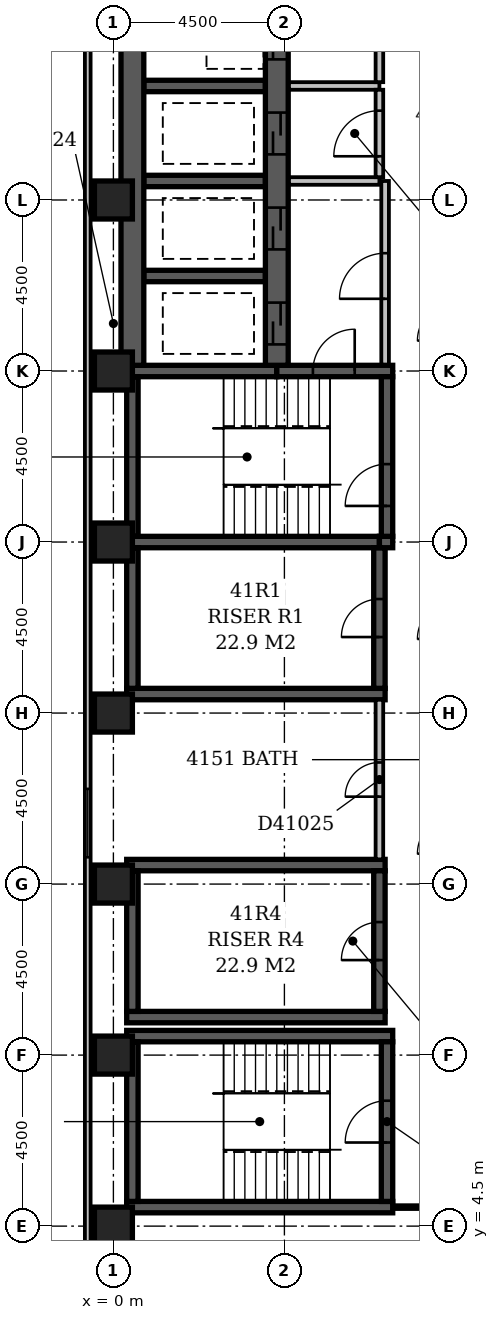
"""IFC4 building model, lengths in metres.
Left out: names, types, materials, properties, quantities, classifications, styles, units other than length and angle.
Written with IfcOpenShell. Run it as: python <this file> out.ifc"""

import sys

from ifc_helpers import new_model, si_unit, direction, frame, frame_2d, origin, origin_2d, place, context, subcontext, project, spatial, rectangle, extrude, element, fill, save


model = new_model("IFC4")
c1 = context("Model", 3, precision=1e-05, world=origin(), true_north=direction((0.0, 1.0)))
c2 = subcontext(c1, "Body", "Model", "MODEL_VIEW")
j1 = project(units=[si_unit("LENGTHUNIT", "METRE"), si_unit("PLANEANGLEUNIT", "RADIAN")], contexts=[c1])
p1 = place(None, origin())
s1 = spatial("IfcSite", under=j1, at=p1, CompositionType="ELEMENT")
p2 = place(p1, origin())
s2 = spatial("IfcBuilding", under=s1, at=p2, CompositionType="ELEMENT")
p3 = place(p2, frame((0.0, 0.0, 162.8)))
s3 = spatial("IfcBuildingStorey", under=s2, at=p3, CompositionType="ELEMENT", Elevation=162.8)
for number, where, z_axis, x_axis in (
    (1, (0.35, 5.0, -0.3), (0.0, 0.0, 1.0), (1.0, 0.0, 0.0)),
    (2, (0.35, 9.5, -0.3), (0.0, 0.0, 1.0), (1.0, 0.0, 0.0)),
):
    element("IfcWall", number, at=place(p3, frame(where, z_axis=z_axis, x_axis=x_axis)), inside=s3, PredefinedType="SHEAR", context=c2, shape_type="SweptSolid", body=[
        extrude(rectangle(XDim=7.0, YDim=0.3, at=frame_2d((3.5, 0.0))), origin(), (0.0, 0.0, 1.0), 3.6),
    ])
for number, where, z_axis, x_axis in (
    (3, (0.35, 10.0, -0.3), (0.0, 0.0, 1.0), (1.0, 0.0, 0.0)),
    (4, (0.35, 14.0, -0.3), (0.0, 0.0, 1.0), (1.0, 0.0, 0.0)),
    (5, (0.35, 18.5, -0.3), (0.0, 0.0, 1.0), (1.0, 0.0, 0.0)),
):
    element("IfcWall", number, at=place(p3, frame(where, z_axis=z_axis, x_axis=x_axis)), inside=s3, PredefinedType="SHEAR", context=c2, shape_type="SweptSolid", body=[
        extrude(rectangle(XDim=6.8, YDim=0.3, at=frame_2d((3.4, 0.0))), origin(), (0.0, 0.0, 1.0), 3.6),
    ])
p4 = place(p3, frame((0.35, 22.5, -0.3), z_axis=(0.0, 0.0, 1.0), x_axis=(1.0, 0.0, 0.0)))
e6 = element("IfcWall", 6, at=p4, inside=s3, PredefinedType="SHEAR", context=c2, shape_type="SweptSolid", body=[
    extrude(rectangle(XDim=6.65, YDim=0.3, at=frame_2d((3.325, 0.0))), origin(), (0.0, 0.0, 1.0), 3.6),
])
p5 = place(p3, frame((0.35, 27.0, -0.3), z_axis=(0.0, 0.0, 1.0), x_axis=(1.0, 0.0, 0.0)))
e7 = element("IfcWall", 7, at=p5, inside=s3, PredefinedType="SHEAR", context=c2, shape_type="SweptSolid", body=[
    extrude(rectangle(XDim=3.95, YDim=0.3, at=frame_2d((1.975, 0.0))), origin(), (0.0, 0.0, 1.0), 3.6),
])
p6 = place(p3, frame((0.5, 5.15, -0.3), z_axis=(0.0, 0.0, 1.0), x_axis=(0.0, 1.0, 0.0)))
e8 = element("IfcWall", 8, at=p6, inside=s3, PredefinedType="SHEAR", context=c2, shape_type="SweptSolid", body=[
    extrude(rectangle(XDim=4.2, YDim=0.3, at=frame_2d((2.1, 0.0))), origin(), (0.0, 0.0, 1.0), 3.6),
])
for number, where, z_axis, x_axis in (
    (9, (0.5, 10.15, -0.3), (0.0, 0.0, 1.0), (0.0, 1.0, 0.0)),
    (10, (0.5, 18.65, -0.3), (0.0, 0.0, 1.0), (0.0, 1.0, 0.0)),
):
    element("IfcWall", number, at=place(p3, frame(where, z_axis=z_axis, x_axis=x_axis)), inside=s3, PredefinedType="SHEAR", context=c2, shape_type="SweptSolid", body=[
        extrude(rectangle(XDim=3.7, YDim=0.3, at=frame_2d((1.85, 0.0))), origin(), (0.0, 0.0, 1.0), 3.6),
    ])
p7 = place(p3, frame((0.5, 22.65, -0.3), z_axis=(0.0, 0.0, 1.0), x_axis=(0.0, 1.0, 0.0)))
e11 = element("IfcWall", 11, at=p7, inside=s3, PredefinedType="SHEAR", context=c2, shape_type="SweptSolid", body=[
    extrude(rectangle(XDim=4.2, YDim=0.3, at=frame_2d((2.1, 0.0))), origin(), (0.0, 0.0, 1.0), 3.6),
])
p8 = place(p3, frame((0.5, 27.15, -0.3), z_axis=(0.0, 0.0, 1.0), x_axis=(0.0, 1.0, 0.0)))
e12 = element("IfcWall", 12, at=p8, inside=s3, PredefinedType="SHEAR", context=c2, shape_type="SweptSolid", body=[
    extrude(rectangle(XDim=22.05, YDim=0.6, at=frame_2d((11.025, 0.0))), origin(), (0.0, 0.0, 1.0), 3.6),
])
for number, where, z_axis, x_axis in (
    (13, (0.8, 29.5, -0.3), (0.0, 0.0, 1.0), (1.0, 0.0, 0.0)),
    (14, (0.8, 32.0, -0.3), (0.0, 0.0, 1.0), (1.0, 0.0, 0.0)),
    (15, (0.8, 34.5, -0.3), (0.0, 0.0, 1.0), (1.0, 0.0, 0.0)),
):
    element("IfcWall", number, at=place(p3, frame(where, z_axis=z_axis, x_axis=x_axis)), inside=s3, PredefinedType="SHEAR", context=c2, shape_type="SweptSolid", body=[
        extrude(rectangle(XDim=3.2, YDim=0.3, at=frame_2d((1.6, 0.0))), origin(), (0.0, 0.0, 1.0), 3.6),
    ])
p9 = place(p3, frame((4.3, 27.0, -0.3), z_axis=(0.0, 0.0, 1.0), x_axis=(1.0, 0.0, 0.0)))
e16 = element("IfcWall", 16, at=p9, inside=s3, PredefinedType="SHEAR", context=c2, shape_type="SweptSolid", body=[
    extrude(rectangle(XDim=3.05, YDim=0.3, at=frame_2d((1.525, 0.0))), origin(), (0.0, 0.0, 1.0), 3.6),
])
p10 = place(p9, frame((0.95, 0.0, 0.3)))
e17 = element("IfcOpeningElement", 17, at=p10, cuts=e16, PredefinedType="OPENING", context=c2, shape_type="SweptSolid", body=[
    extrude(rectangle(XDim=1.1, YDim=2.1, at=frame_2d((0.55, 1.05))), frame((0.0, 0.162, 0.0), z_axis=(0.0, -1.0, 0.0), x_axis=(1.0, 0.0, 0.0)), (0.0, 0.0, 1.0), 0.324),
])
p11 = place(p3, frame((4.3, 27.15, -0.3), z_axis=(0.0, 0.0, 1.0), x_axis=(0.0, 1.0, 0.0)))
e18 = element("IfcWall", 18, at=p11, inside=s3, PredefinedType="SHEAR", context=c2, shape_type="SweptSolid", body=[
    extrude(rectangle(XDim=22.05, YDim=0.6, at=frame_2d((11.025, 0.0))), origin(), (0.0, 0.0, 1.0), 3.6),
])
p12 = place(p11, frame((3.05, 0.0, 0.3)))
e19 = element("IfcOpeningElement", 19, at=p12, cuts=e18, PredefinedType="OPENING", context=c2, shape_type="SweptSolid", body=[
    extrude(rectangle(XDim=1.1, YDim=2.1, at=frame_2d((0.55, 1.05))), frame((0.0, 0.312, 0.0), z_axis=(0.0, -1.0, 0.0), x_axis=(1.0, 0.0, 0.0)), (0.0, 0.0, 1.0), 0.624),
])
p13 = place(p11, frame((0.55, 0.0, 0.3)))
e20 = element("IfcOpeningElement", 20, at=p13, cuts=e18, PredefinedType="OPENING", context=c2, shape_type="SweptSolid", body=[
    extrude(rectangle(XDim=1.1, YDim=2.1, at=frame_2d((0.55, 1.05))), frame((0.0, 0.312, 0.0), z_axis=(0.0, -1.0, 0.0), x_axis=(1.0, 0.0, 0.0)), (0.0, 0.0, 1.0), 0.624),
])
p14 = place(p11, frame((20.55, 0.0, 0.3)))
e21 = element("IfcOpeningElement", 21, at=p14, cuts=e18, PredefinedType="OPENING", context=c2, shape_type="SweptSolid", body=[
    extrude(rectangle(XDim=1.1, YDim=2.1, at=frame_2d((0.55, 1.05))), frame((0.0, 0.312, 0.0), z_axis=(0.0, -1.0, 0.0), x_axis=(1.0, 0.0, 0.0)), (0.0, 0.0, 1.0), 0.624),
])
p15 = place(p11, frame((18.05, 0.0, 0.3)))
e22 = element("IfcOpeningElement", 22, at=p15, cuts=e18, PredefinedType="OPENING", context=c2, shape_type="SweptSolid", body=[
    extrude(rectangle(XDim=1.1, YDim=2.1, at=frame_2d((0.55, 1.05))), frame((0.0, 0.312, 0.0), z_axis=(0.0, -1.0, 0.0), x_axis=(1.0, 0.0, 0.0)), (0.0, 0.0, 1.0), 0.624),
])
p16 = place(p11, frame((15.55, 0.0, 0.3)))
e23 = element("IfcOpeningElement", 23, at=p16, cuts=e18, PredefinedType="OPENING", context=c2, shape_type="SweptSolid", body=[
    extrude(rectangle(XDim=1.1, YDim=2.1, at=frame_2d((0.55, 1.05))), frame((0.0, 0.312, 0.0), z_axis=(0.0, -1.0, 0.0), x_axis=(1.0, 0.0, 0.0)), (0.0, 0.0, 1.0), 0.624),
])
p17 = place(p11, frame((13.05, 0.0, 0.3)))
e24 = element("IfcOpeningElement", 24, at=p17, cuts=e18, PredefinedType="OPENING", context=c2, shape_type="SweptSolid", body=[
    extrude(rectangle(XDim=1.1, YDim=2.1, at=frame_2d((0.55, 1.05))), frame((0.0, 0.312, 0.0), z_axis=(0.0, -1.0, 0.0), x_axis=(1.0, 0.0, 0.0)), (0.0, 0.0, 1.0), 0.624),
])
p18 = place(p11, frame((10.55, 0.0, 0.3)))
e25 = element("IfcOpeningElement", 25, at=p18, cuts=e18, PredefinedType="OPENING", context=c2, shape_type="SweptSolid", body=[
    extrude(rectangle(XDim=1.1, YDim=2.1, at=frame_2d((0.55, 1.05))), frame((0.0, 0.312, 0.0), z_axis=(0.0, -1.0, 0.0), x_axis=(1.0, 0.0, 0.0)), (0.0, 0.0, 1.0), 0.624),
])
p19 = place(p11, frame((8.05, 0.0, 0.3)))
e26 = element("IfcOpeningElement", 26, at=p19, cuts=e18, PredefinedType="OPENING", context=c2, shape_type="SweptSolid", body=[
    extrude(rectangle(XDim=1.1, YDim=2.1, at=frame_2d((0.55, 1.05))), frame((0.0, 0.312, 0.0), z_axis=(0.0, -1.0, 0.0), x_axis=(1.0, 0.0, 0.0)), (0.0, 0.0, 1.0), 0.624),
])
p20 = place(p11, frame((5.55, 0.0, 0.3)))
e27 = element("IfcOpeningElement", 27, at=p20, cuts=e18, PredefinedType="OPENING", context=c2, shape_type="SweptSolid", body=[
    extrude(rectangle(XDim=1.1, YDim=2.1, at=frame_2d((0.55, 1.05))), frame((0.0, 0.312, 0.0), z_axis=(0.0, -1.0, 0.0), x_axis=(1.0, 0.0, 0.0)), (0.0, 0.0, 1.0), 0.624),
])
p21 = place(p3, frame((7.0, 10.15, -0.3), z_axis=(0.0, 0.0, 1.0), x_axis=(0.0, 1.0, 0.0)))
e28 = element("IfcWall", 28, at=p21, inside=s3, PredefinedType="SHEAR", context=c2, shape_type="SweptSolid", body=[
    extrude(rectangle(XDim=3.7, YDim=0.3, at=frame_2d((1.85, 0.0))), origin(), (0.0, 0.0, 1.0), 3.6),
])
p22 = place(p21, frame((1.35, 0.0, 0.3)))
e29 = element("IfcOpeningElement", 29, at=p22, cuts=e28, PredefinedType="OPENING", context=c2, shape_type="SweptSolid", body=[
    extrude(rectangle(XDim=1.0, YDim=2.1, at=frame_2d((0.5, 1.05))), frame((0.0, 0.162, 0.0), z_axis=(0.0, -1.0, 0.0), x_axis=(1.0, 0.0, 0.0)), (0.0, 0.0, 1.0), 0.324),
])
p23 = place(p3, frame((7.0, 18.65, -0.3), z_axis=(0.0, 0.0, 1.0), x_axis=(0.0, 1.0, 0.0)))
e30 = element("IfcWall", 30, at=p23, inside=s3, PredefinedType="SHEAR", context=c2, shape_type="SweptSolid", body=[
    extrude(rectangle(XDim=3.7, YDim=0.3, at=frame_2d((1.85, 0.0))), origin(), (0.0, 0.0, 1.0), 3.6),
])
p24 = place(p23, frame((1.35, 0.0, 0.3)))
e31 = element("IfcOpeningElement", 31, at=p24, cuts=e30, PredefinedType="OPENING", context=c2, shape_type="SweptSolid", body=[
    extrude(rectangle(XDim=1.0, YDim=2.1, at=frame_2d((0.5, 1.05))), frame((0.0, 0.162, 0.0), z_axis=(0.0, -1.0, 0.0), x_axis=(1.0, 0.0, 0.0)), (0.0, 0.0, 1.0), 0.324),
])
p25 = place(p3, frame((7.0, 22.5, -0.3), z_axis=(0.0, 0.0, 1.0), x_axis=(1.0, 0.0, 0.0)))
e32 = element("IfcWall", 32, at=p25, inside=s3, PredefinedType="SHEAR", context=c2, shape_type="SweptSolid", body=[
    extrude(rectangle(XDim=0.35, YDim=0.3, at=frame_2d((0.175, 0.0))), origin(), (0.0, 0.0, 1.0), 3.6),
])
p26 = place(p3, frame((7.2, 5.15, -0.3), z_axis=(0.0, 0.0, 1.0), x_axis=(0.0, 1.0, 0.0)))
e33 = element("IfcWall", 33, at=p26, inside=s3, PredefinedType="SHEAR", context=c2, shape_type="SweptSolid", body=[
    extrude(rectangle(XDim=4.2, YDim=0.3, at=frame_2d((2.1, 0.0))), origin(), (0.0, 0.0, 1.0), 3.6),
])
p27 = place(p26, frame((1.55, 0.0, 0.3)))
e34 = element("IfcOpeningElement", 34, at=p27, cuts=e33, PredefinedType="OPENING", context=c2, shape_type="SweptSolid", body=[
    extrude(rectangle(XDim=1.1, YDim=2.1, at=frame_2d((0.55, 1.05))), frame((0.0, 0.162, 0.0), z_axis=(0.0, -1.0, 0.0), x_axis=(1.0, 0.0, 0.0)), (0.0, 0.0, 1.0), 0.324),
])
p28 = place(p3, frame((7.2, 22.65, -0.3), z_axis=(0.0, 0.0, 1.0), x_axis=(0.0, 1.0, 0.0)))
e35 = element("IfcWall", 35, at=p28, inside=s3, PredefinedType="SHEAR", context=c2, shape_type="SweptSolid", body=[
    extrude(rectangle(XDim=4.2, YDim=0.3, at=frame_2d((2.1, 0.0))), origin(), (0.0, 0.0, 1.0), 3.6),
])
p29 = place(p28, frame((0.8, 0.0, 0.3)))
e36 = element("IfcOpeningElement", 36, at=p29, cuts=e35, PredefinedType="OPENING", context=c2, shape_type="SweptSolid", body=[
    extrude(rectangle(XDim=1.1, YDim=2.1, at=frame_2d((0.55, 1.05))), frame((0.0, 0.162, 0.0), z_axis=(0.0, -1.0, 0.0), x_axis=(1.0, 0.0, 0.0)), (0.0, 0.0, 1.0), 0.324),
])
for number, where, z_axis, x_axis in (
    (37, (0.0, 4.5, -0.3), (0.0, 0.0, 1.0), (1.0, 0.0, 0.0)),
    (38, (0.0, 9.0, -0.3), (0.0, 0.0, 1.0), (1.0, 0.0, 0.0)),
    (39, (0.0, 13.5, -0.3), (0.0, 0.0, 1.0), (1.0, 0.0, 0.0)),
    (40, (0.0, 18.0, -0.3), (0.0, 0.0, 1.0), (1.0, 0.0, 0.0)),
    (41, (0.0, 22.5, -0.3), (0.0, 0.0, 1.0), (1.0, 0.0, 0.0)),
    (42, (0.0, 27.0, -0.3), (0.0, 0.0, 1.0), (1.0, 0.0, 0.0)),
    (43, (0.0, 31.5, -0.3), (0.0, 0.0, 1.0), (1.0, 0.0, 0.0)),
):
    element("IfcColumn", number, at=place(p3, frame(where, z_axis=z_axis, x_axis=x_axis)), inside=s3, PredefinedType="COLUMN", context=c2, shape_type="SweptSolid", body=[
        extrude(rectangle(XDim=1.0, YDim=1.0, at=origin_2d()), origin(), (0.0, 0.0, 1.0), 3.6),
    ])
p30 = place(p3, frame((-0.675, 59.1, 0.0), z_axis=(0.0, 0.0, 1.0), x_axis=(0.0, -1.0, 0.0)))
e44 = element("IfcWall", 44, at=p30, inside=s3, PredefinedType="STANDARD", context=c2, shape_type="SweptSolid", body=[
    extrude(rectangle(XDim=55.35, YDim=0.15, at=frame_2d((27.675, 0.0))), origin(), (0.0, 0.0, 1.0), 2.7),
])
p31 = place(p30, frame((43.095, 0.0, 0.6)))
e45 = element("IfcOpeningElement", 45, at=p31, cuts=e44, PredefinedType="OPENING", context=c2, shape_type="SweptSolid", body=[
    extrude(rectangle(XDim=1.8, YDim=1.8, at=frame_2d((0.9, 0.9))), frame((0.0, 0.087, 0.0), z_axis=(0.0, -1.0, 0.0), x_axis=(1.0, 0.0, 0.0)), (0.0, 0.0, 1.0), 0.174),
])
p32 = place(p3, frame((4.62, 34.5, 0.0), z_axis=(0.0, 0.0, 1.0), x_axis=(1.0, 0.0, 0.0)))
e46 = element("IfcWall", 46, at=p32, inside=s3, PredefinedType="PARTITIONING", context=c2, shape_type="SweptSolid", body=[
    extrude(rectangle(XDim=2.38, YDim=0.2, at=frame_2d((1.19, 0.0))), origin(), (0.0, 0.0, 1.0), 3.3),
])
p33 = place(p3, frame((7.0, 34.6, 0.0), z_axis=(0.0, 0.0, 1.0), x_axis=(0.0, 1.0, 0.0)))
e47 = element("IfcWall", 47, at=p33, inside=s3, PredefinedType="PARTITIONING", context=c2, shape_type="SweptSolid", body=[
    extrude(rectangle(XDim=14.9, YDim=0.2, at=frame_2d((7.45, 0.0))), origin(), (0.0, 0.0, 1.0), 3.3),
])
p34 = place(p33, frame((2.8, 0.0, 0.0)))
e48 = element("IfcOpeningElement", 48, at=p34, cuts=e47, PredefinedType="OPENING", context=c2, shape_type="SweptSolid", body=[
    extrude(rectangle(XDim=1.2, YDim=2.1, at=frame_2d((0.6, 1.05))), frame((0.0, 0.112, 0.0), z_axis=(0.0, -1.0, 0.0), x_axis=(1.0, 0.0, 0.0)), (0.0, 0.0, 1.0), 0.224),
])
p35 = place(p33, frame((9.8, 0.0, 0.0)))
e49 = element("IfcOpeningElement", 49, at=p35, cuts=e47, PredefinedType="OPENING", context=c2, shape_type="SweptSolid", body=[
    extrude(rectangle(XDim=1.2, YDim=2.1, at=frame_2d((0.6, 1.05))), frame((0.0, 0.112, 0.0), z_axis=(0.0, -1.0, 0.0), x_axis=(1.0, 0.0, 0.0)), (0.0, 0.0, 1.0), 0.224),
])
p36 = place(p3, frame((4.62, 32.0, 0.0), z_axis=(0.0, 0.0, 1.0), x_axis=(1.0, 0.0, 0.0)))
e50 = element("IfcWall", 50, at=p36, inside=s3, PredefinedType="PARTITIONING", context=c2, shape_type="SweptSolid", body=[
    extrude(rectangle(XDim=2.38, YDim=0.2, at=frame_2d((1.19, 0.0))), origin(), (0.0, 0.0, 1.0), 3.3),
])
p37 = place(p3, frame((7.0, 32.1, 0.0), z_axis=(0.0, 0.0, 1.0), x_axis=(0.0, 1.0, 0.0)))
e51 = element("IfcWall", 51, at=p37, inside=s3, PredefinedType="PARTITIONING", context=c2, shape_type="SweptSolid", body=[
    extrude(rectangle(XDim=2.3, YDim=0.2, at=frame_2d((1.15, 0.0))), origin(), (0.0, 0.0, 1.0), 3.3),
])
p38 = place(p37, frame((0.55, 0.0, 0.0)))
e52 = element("IfcOpeningElement", 52, at=p38, cuts=e51, PredefinedType="OPENING", context=c2, shape_type="SweptSolid", body=[
    extrude(rectangle(XDim=1.2, YDim=2.1, at=frame_2d((0.6, 1.05))), frame((0.0, 0.112, 0.0), z_axis=(0.0, -1.0, 0.0), x_axis=(1.0, 0.0, 0.0)), (0.0, 0.0, 1.0), 0.224),
])
p39 = place(p3, frame((7.15, 27.17, 0.0), z_axis=(0.0, 0.0, 1.0), x_axis=(0.0, 1.0, 0.0)))
e53 = element("IfcWall", 53, at=p39, inside=s3, PredefinedType="PARTITIONING", context=c2, shape_type="SweptSolid", body=[
    extrude(rectangle(XDim=4.83, YDim=0.2, at=frame_2d((2.415, 0.0))), origin(), (0.0, 0.0, 1.0), 3.3),
])
p40 = place(p39, frame((1.73, 0.0, 0.0)))
e54 = element("IfcOpeningElement", 54, at=p40, cuts=e53, PredefinedType="OPENING", context=c2, shape_type="SweptSolid", body=[
    extrude(rectangle(XDim=1.2, YDim=2.1, at=frame_2d((0.6, 1.05))), frame((0.0, 0.112, 0.0), z_axis=(0.0, -1.0, 0.0), x_axis=(1.0, 0.0, 0.0)), (0.0, 0.0, 1.0), 0.224),
])
p41 = place(p3, frame((0.0, 4.5, 0.0), z_axis=(0.0, 0.0, 1.0), x_axis=(0.0, 1.0, 0.0)))
e55 = element("IfcWall", 55, at=p41, inside=s3, PredefinedType="PARTITIONING", context=c2, shape_type="SweptSolid", body=[
    extrude(rectangle(XDim=0.5, YDim=0.1, at=frame_2d((0.25, 0.0))), origin(), (0.0, 0.0, 1.0), 2.7),
])
p42 = place(p3, frame((7.349, 5.0, 0.0), z_axis=(0.0, 0.0, 1.0), x_axis=(1.0, 0.0, 0.0)))
e56 = element("IfcWall", 56, at=p42, inside=s3, PredefinedType="PARTITIONING", context=c2, shape_type="SweptSolid", body=[
    extrude(rectangle(XDim=1.551, YDim=0.1, at=frame_2d((0.775, 0.0))), origin(), (0.0, 0.0, 1.0), 3.3),
])
p43 = place(p3, frame((7.0, 14.15, 0.0), z_axis=(0.0, 0.0, 1.0), x_axis=(0.0, 1.0, 0.0)))
e57 = element("IfcWall", 57, at=p43, inside=s3, PredefinedType="PARTITIONING", context=c2, shape_type="SweptSolid", body=[
    extrude(rectangle(XDim=4.2, YDim=0.2, at=frame_2d((2.1, 0.0))), origin(), (0.0, 0.0, 1.0), 3.3),
])
p44 = place(p43, frame((1.65, 0.0, 0.0)))
e58 = element("IfcOpeningElement", 58, at=p44, cuts=e57, PredefinedType="OPENING", context=c2, shape_type="SweptSolid", body=[
    extrude(rectangle(XDim=0.9, YDim=2.1, at=frame_2d((0.45, 1.05))), frame((0.0, 0.112, 0.0), z_axis=(0.0, -1.0, 0.0), x_axis=(1.0, 0.0, 0.0)), (0.0, 0.0, 1.0), 0.224),
])
p45 = place(p31, origin())
e59 = element("IfcWindow", 59, at=p45, inside=s3, PartitioningType="SINGLE_PANEL", PredefinedType="WINDOW", context=c2, shape_type="SweptSolid", body=[
    extrude(rectangle(XDim=1.8, YDim=1.8, at=frame_2d((0.9, 0.9))), frame((0.0, 0.03, 0.0), z_axis=(0.0, -1.0, 0.0), x_axis=(1.0, 0.0, 0.0)), (0.0, 0.0, 1.0), 0.06),
])
fill(e45, e59)
p46 = place(p40, origin())
e60 = element("IfcDoor", 60, at=p46, inside=s3, OperationType="SINGLE_SWING_LEFT", PredefinedType="DOOR", context=c2, shape_type="SweptSolid", body=[
    extrude(rectangle(XDim=1.2, YDim=2.1, at=frame_2d((0.6, 1.05))), frame((0.0, 0.025, 0.0), z_axis=(0.0, -1.0, 0.0), x_axis=(1.0, 0.0, 0.0)), (0.0, 0.0, 1.0), 0.05),
])
fill(e54, e60)
p47 = place(p12, origin())
e61 = element("IfcDoor", 61, at=p47, inside=s3, OperationType="SLIDING_TO_LEFT", PredefinedType="DOOR", context=c2, shape_type="SweptSolid", body=[
    extrude(rectangle(XDim=1.1, YDim=2.1, at=frame_2d((0.55, 1.05))), frame((0.0, 0.025, 0.0), z_axis=(0.0, -1.0, 0.0), x_axis=(1.0, 0.0, 0.0)), (0.0, 0.0, 1.0), 0.05),
])
fill(e19, e61)
p48 = place(p13, origin())
e62 = element("IfcDoor", 62, at=p48, inside=s3, OperationType="SLIDING_TO_LEFT", PredefinedType="DOOR", context=c2, shape_type="SweptSolid", body=[
    extrude(rectangle(XDim=1.1, YDim=2.1, at=frame_2d((0.55, 1.05))), frame((0.0, 0.025, 0.0), z_axis=(0.0, -1.0, 0.0), x_axis=(1.0, 0.0, 0.0)), (0.0, 0.0, 1.0), 0.05),
])
fill(e20, e62)
p49 = place(p19, origin())
e63 = element("IfcDoor", 63, at=p49, inside=s3, OperationType="SLIDING_TO_LEFT", PredefinedType="DOOR", context=c2, shape_type="SweptSolid", body=[
    extrude(rectangle(XDim=1.1, YDim=2.1, at=frame_2d((0.55, 1.05))), frame((0.0, 0.025, 0.0), z_axis=(0.0, -1.0, 0.0), x_axis=(1.0, 0.0, 0.0)), (0.0, 0.0, 1.0), 0.05),
])
fill(e26, e63)
p50 = place(p38, origin())
e64 = element("IfcDoor", 64, at=p50, inside=s3, OperationType="SINGLE_SWING_LEFT", PredefinedType="DOOR", context=c2, shape_type="SweptSolid", body=[
    extrude(rectangle(XDim=1.2, YDim=2.1, at=frame_2d((0.6, 1.05))), frame((0.0, 0.025, 0.0), z_axis=(0.0, -1.0, 0.0), x_axis=(1.0, 0.0, 0.0)), (0.0, 0.0, 1.0), 0.05),
])
fill(e52, e64)
p51 = place(p20, origin())
e65 = element("IfcDoor", 65, at=p51, inside=s3, OperationType="SLIDING_TO_LEFT", PredefinedType="DOOR", context=c2, shape_type="SweptSolid", body=[
    extrude(rectangle(XDim=1.1, YDim=2.1, at=frame_2d((0.55, 1.05))), frame((0.0, 0.025, 0.0), z_axis=(0.0, -1.0, 0.0), x_axis=(1.0, 0.0, 0.0)), (0.0, 0.0, 1.0), 0.05),
])
fill(e27, e65)
p52 = place(p24, origin())
e66 = element("IfcDoor", 66, at=p52, inside=s3, OperationType="SINGLE_SWING_LEFT", PredefinedType="DOOR", context=c2, shape_type="SweptSolid", body=[
    extrude(rectangle(XDim=1.0, YDim=2.1, at=frame_2d((0.5, 1.05))), frame((0.0, 0.025, 0.0), z_axis=(0.0, -1.0, 0.0), x_axis=(1.0, 0.0, 0.0)), (0.0, 0.0, 1.0), 0.05),
])
fill(e31, e66)
p53 = place(p22, origin())
e67 = element("IfcDoor", 67, at=p53, inside=s3, OperationType="SINGLE_SWING_LEFT", PredefinedType="DOOR", context=c2, shape_type="SweptSolid", body=[
    extrude(rectangle(XDim=1.0, YDim=2.1, at=frame_2d((0.5, 1.05))), frame((0.0, 0.025, 0.0), z_axis=(0.0, -1.0, 0.0), x_axis=(1.0, 0.0, 0.0)), (0.0, 0.0, 1.0), 0.05),
])
fill(e29, e67)
p54 = place(p10, frame((1.1, 0.0, 0.0), z_axis=(0.0, 0.0, 1.0), x_axis=(-1.0, 0.0, 0.0)))
e68 = element("IfcDoor", 68, at=p54, inside=s3, OperationType="SINGLE_SWING_LEFT", PredefinedType="DOOR", context=c2, shape_type="SweptSolid", body=[
    extrude(rectangle(XDim=1.1, YDim=2.1, at=frame_2d((0.55, 1.05))), frame((0.0, 0.025, 0.0), z_axis=(0.0, -1.0, 0.0), x_axis=(1.0, 0.0, 0.0)), (0.0, 0.0, 1.0), 0.05),
])
fill(e17, e68)
p55 = place(p29, origin())
e69 = element("IfcDoor", 69, at=p55, inside=s3, OperationType="SINGLE_SWING_LEFT", PredefinedType="DOOR", context=c2, shape_type="SweptSolid", body=[
    extrude(rectangle(XDim=1.1, YDim=2.1, at=frame_2d((0.55, 1.05))), frame((0.0, 0.025, 0.0), z_axis=(0.0, -1.0, 0.0), x_axis=(1.0, 0.0, 0.0)), (0.0, 0.0, 1.0), 0.05),
])
fill(e36, e69)
p56 = place(p27, origin())
e70 = element("IfcDoor", 70, at=p56, inside=s3, OperationType="SINGLE_SWING_LEFT", PredefinedType="DOOR", context=c2, shape_type="SweptSolid", body=[
    extrude(rectangle(XDim=1.1, YDim=2.1, at=frame_2d((0.55, 1.05))), frame((0.0, 0.025, 0.0), z_axis=(0.0, -1.0, 0.0), x_axis=(1.0, 0.0, 0.0)), (0.0, 0.0, 1.0), 0.05),
])
fill(e34, e70)
p57 = place(p44, origin())
e71 = element("IfcDoor", 71, at=p57, inside=s3, OperationType="SINGLE_SWING_LEFT", PredefinedType="DOOR", context=c2, shape_type="SweptSolid", body=[
    extrude(rectangle(XDim=0.9, YDim=2.1, at=frame_2d((0.45, 1.05))), frame((0.0, 0.025, 0.0), z_axis=(0.0, -1.0, 0.0), x_axis=(1.0, 0.0, 0.0)), (0.0, 0.0, 1.0), 0.05),
])
fill(e58, e71)
save(model, sys.argv[1])
